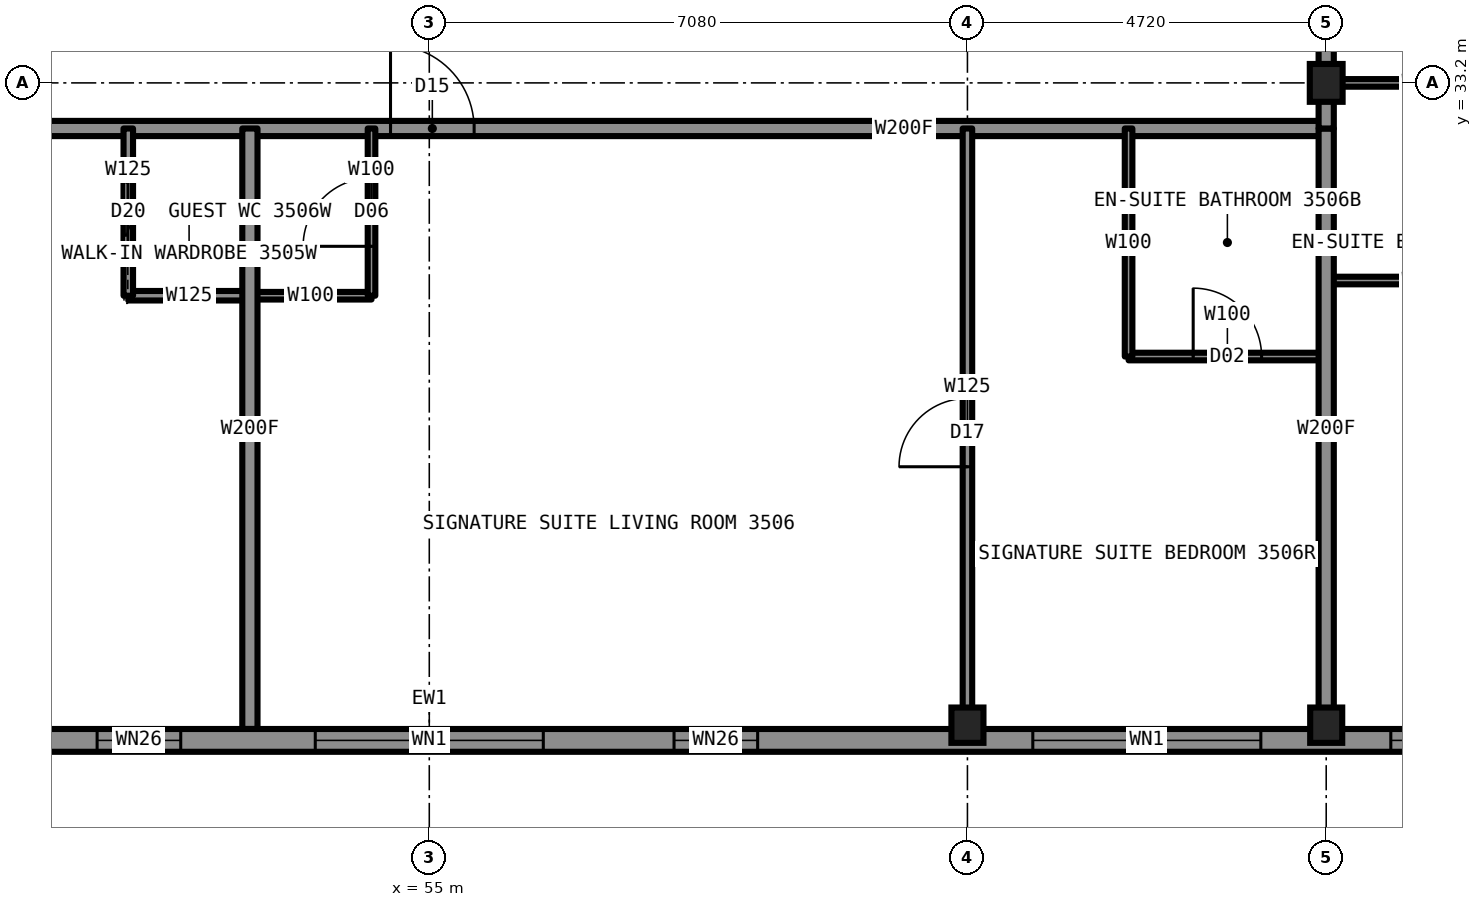
"""IFC4 building model, lengths in metres.
Left out: names, types, materials, properties, quantities, classifications, styles, units other than length and angle.
Written with IfcOpenShell. Run it as: python <this file> out.ifc"""

import sys

from ifc_helpers import new_model, si_unit, direction, frame, frame_2d, origin, origin_2d, place, context, subcontext, project, spatial, rectangle, i_section, extrude, element, fill, save


model = new_model("IFC4")
c1 = context("Model", 3, precision=1e-05, world=origin(), true_north=direction((0.0, 1.0)))
c2 = subcontext(c1, "Body", "Model", "MODEL_VIEW")
j1 = project(units=[si_unit("LENGTHUNIT", "METRE"), si_unit("PLANEANGLEUNIT", "RADIAN")], contexts=[c1])
p1 = place(None, origin())
s1 = spatial("IfcSite", under=j1, at=p1, CompositionType="ELEMENT")
p2 = place(p1, origin())
s2 = spatial("IfcBuilding", under=s1, at=p2, CompositionType="ELEMENT")
p3 = place(p2, frame((0.0, 0.0, 124.9)))
s3 = spatial("IfcBuildingStorey", under=s2, at=p3, CompositionType="ELEMENT", Elevation=124.9)
for number, where, z_axis, x_axis in (
    (1, (62.08, 24.75, 0.0), (0.0, 0.0, 1.0), (1.0, 0.0, 0.0)),
    (2, (66.8, 24.75, 0.0), (0.0, 0.0, 1.0), (1.0, 0.0, 0.0)),
):
    element("IfcColumn", number, at=place(p3, frame(where, z_axis=z_axis, x_axis=x_axis)), inside=s3, PredefinedType="COLUMN", context=c2, shape_type="SweptSolid", body=[
        extrude(i_section(OverallWidth=0.422, OverallDepth=0.465, WebThickness=0.045, FlangeThickness=0.073, at=origin_2d()), origin(), (0.0, 0.0, 1.0), 3.5),
    ])
p4 = place(p3, frame((66.8, 33.2, 0.0), z_axis=(0.0, 0.0, 1.0), x_axis=(1.0, 0.0, 0.0)))
e3 = element("IfcColumn", 3, at=p4, inside=s3, PredefinedType="COLUMN", context=c2, shape_type="SweptSolid", body=[
    extrude(i_section(OverallWidth=0.432, OverallDepth=0.498, WebThickness=0.056, FlangeThickness=0.089, at=origin_2d()), origin(), (0.0, 0.0, 1.0), 3.5),
])
p5 = place(p3, frame((66.8, 33.2, 0.0), z_axis=(0.0, 0.0, 1.0), x_axis=(1.0, 0.0, 0.0)))
e4 = element("IfcWall", 4, at=p5, inside=s3, PredefinedType="PARTITIONING", context=c2, shape_type="SweptSolid", body=[
    extrude(rectangle(XDim=2.6, YDim=0.1, at=frame_2d((1.3, 0.0))), origin(), (0.0, 0.0, 1.0), 2.573),
])
p6 = place(p3, frame((43.2, 32.6, 0.0), z_axis=(0.0, 0.0, 1.0), x_axis=(1.0, 0.0, 0.0)))
e5 = element("IfcWall", 5, at=p6, inside=s3, PredefinedType="PARTITIONING", context=c2, shape_type="SweptSolid", body=[
    extrude(rectangle(XDim=23.6, YDim=0.2, at=frame_2d((11.8, 0.0))), origin(), (0.0, 0.0, 1.0), 3.33),
])
p7 = place(p6, frame((3.0, 0.0, 0.0)))
e6 = element("IfcOpeningElement", 6, at=p7, cuts=e5, PredefinedType="OPENING", context=c2, shape_type="SweptSolid", body=[
    extrude(rectangle(XDim=1.0, YDim=2.2, at=frame_2d((0.5, 1.1))), frame((0.0, 0.11, 0.0), z_axis=(0.0, -1.0, 0.0), x_axis=(1.0, 0.0, 0.0)), (0.0, 0.0, 1.0), 0.22),
])
p8 = place(p6, frame((11.29, 0.0, 0.0)))
e7 = element("IfcOpeningElement", 7, at=p8, cuts=e5, PredefinedType="OPENING", context=c2, shape_type="SweptSolid", body=[
    extrude(rectangle(XDim=1.1, YDim=2.2, at=frame_2d((0.55, 1.1))), frame((0.0, 0.11, 0.0), z_axis=(0.0, -1.0, 0.0), x_axis=(1.0, 0.0, 0.0)), (0.0, 0.0, 1.0), 0.22),
])
p9 = place(p3, frame((66.8, 30.6, 0.0), z_axis=(0.0, 0.0, 1.0), x_axis=(1.0, 0.0, 0.0)))
e8 = element("IfcWall", 8, at=p9, inside=s3, PredefinedType="PARTITIONING", context=c2, shape_type="SweptSolid", body=[
    extrude(rectangle(XDim=2.6, YDim=0.1, at=frame_2d((1.3, 0.0))), origin(), (0.0, 0.0, 1.0), 3.33),
])
p10 = place(p3, frame((52.64, 30.4, 0.0), z_axis=(0.0, 0.0, 1.0), x_axis=(1.0, 0.0, 0.0)))
e9 = element("IfcWall", 9, at=p10, inside=s3, PredefinedType="PARTITIONING", context=c2, shape_type="SweptSolid", body=[
    extrude(rectangle(XDim=1.6, YDim=0.1, at=frame_2d((0.8, 0.0))), origin(), (0.0, 0.0, 1.0), 3.33),
])
p11 = place(p3, frame((51.04, 30.4, 0.0), z_axis=(0.0, 0.0, 1.0), x_axis=(1.0, 0.0, 0.0)))
e10 = element("IfcWall", 10, at=p11, inside=s3, PredefinedType="PARTITIONING", context=c2, shape_type="SweptSolid", body=[
    extrude(rectangle(XDim=1.6, YDim=0.125, at=frame_2d((0.8, 0.0))), origin(), (0.0, 0.0, 1.0), 3.33),
])
p12 = place(p3, frame((64.2, 29.6, 0.0), z_axis=(0.0, 0.0, 1.0), x_axis=(1.0, 0.0, 0.0)))
e11 = element("IfcWall", 11, at=p12, inside=s3, PredefinedType="PARTITIONING", context=c2, shape_type="SweptSolid", body=[
    extrude(rectangle(XDim=2.6, YDim=0.1, at=frame_2d((1.3, 0.0))), origin(), (0.0, 0.0, 1.0), 3.33),
])
p13 = place(p12, frame((0.85, 0.0, 0.0)))
e12 = element("IfcOpeningElement", 12, at=p13, cuts=e11, PredefinedType="OPENING", context=c2, shape_type="SweptSolid", body=[
    extrude(rectangle(XDim=0.9, YDim=2.1, at=frame_2d((0.45, 1.05))), frame((0.0, 0.06, 0.0), z_axis=(0.0, -1.0, 0.0), x_axis=(1.0, 0.0, 0.0)), (0.0, 0.0, 1.0), 0.12),
])
p14 = place(p3, frame((54.24, 30.4, 0.0), z_axis=(0.0, 0.0, 1.0), x_axis=(0.0, 1.0, 0.0)))
e13 = element("IfcWall", 13, at=p14, inside=s3, PredefinedType="PARTITIONING", context=c2, shape_type="SweptSolid", body=[
    extrude(rectangle(XDim=2.2, YDim=0.1, at=frame_2d((1.1, 0.0))), origin(), (0.0, 0.0, 1.0), 3.33),
])
p15 = place(p14, frame((0.65, 0.0, 0.0)))
e14 = element("IfcOpeningElement", 14, at=p15, cuts=e13, PredefinedType="OPENING", context=c2, shape_type="SweptSolid", body=[
    extrude(rectangle(XDim=0.9, YDim=2.1, at=frame_2d((0.45, 1.05))), frame((0.0, 0.06, 0.0), z_axis=(0.0, -1.0, 0.0), x_axis=(1.0, 0.0, 0.0)), (0.0, 0.0, 1.0), 0.12),
])
p16 = place(p3, frame((52.64, 24.7, 0.0), z_axis=(0.0, 0.0, 1.0), x_axis=(0.0, 1.0, 0.0)))
e15 = element("IfcWall", 15, at=p16, inside=s3, PredefinedType="PARTITIONING", context=c2, shape_type="SweptSolid", body=[
    extrude(rectangle(XDim=7.9, YDim=0.2, at=frame_2d((3.95, 0.0))), origin(), (0.0, 0.0, 1.0), 3.33),
])
p17 = place(p3, frame((51.04, 30.4, 0.0), z_axis=(0.0, 0.0, 1.0), x_axis=(0.0, 1.0, 0.0)))
e16 = element("IfcWall", 16, at=p17, inside=s3, PredefinedType="PARTITIONING", context=c2, shape_type="SweptSolid", body=[
    extrude(rectangle(XDim=2.2, YDim=0.125, at=frame_2d((1.1, 0.0))), origin(), (0.0, 0.0, 1.0), 3.33),
])
p18 = place(p17, frame((0.7, 0.0, 0.0)))
e17 = element("IfcOpeningElement", 17, at=p18, cuts=e16, PredefinedType="OPENING", context=c2, shape_type="SweptSolid", body=[
    extrude(rectangle(XDim=0.8, YDim=2.1, at=frame_2d((0.4, 1.05))), frame((0.0, 0.073, 0.0), z_axis=(0.0, -1.0, 0.0), x_axis=(1.0, 0.0, 0.0)), (0.0, 0.0, 1.0), 0.145),
])
p19 = place(p3, frame((66.8, 33.22, 0.0), z_axis=(0.0, 0.0, 1.0), x_axis=(0.0, 1.0, 0.0)))
e18 = element("IfcWall", 18, at=p19, inside=s3, PredefinedType="PARTITIONING", context=c2, shape_type="SweptSolid", body=[
    extrude(rectangle(XDim=23.58, YDim=0.2, at=frame_2d((11.79, 0.0))), origin(), (0.0, 0.0, 1.0), 3.33),
])
p20 = place(p19, frame((7.85, 0.0, 0.0)))
e19 = element("IfcOpeningElement", 19, at=p20, cuts=e18, PredefinedType="OPENING", context=c2, shape_type="SweptSolid", body=[
    extrude(rectangle(XDim=1.0, YDim=2.2, at=frame_2d((0.5, 1.1))), frame((0.0, 0.11, 0.0), z_axis=(0.0, -1.0, 0.0), x_axis=(1.0, 0.0, 0.0)), (0.0, 0.0, 1.0), 0.22),
])
p21 = place(p19, frame((12.42, 0.0, 0.0)))
e20 = element("IfcOpeningElement", 20, at=p21, cuts=e18, PredefinedType="OPENING", context=c2, shape_type="SweptSolid", body=[
    extrude(rectangle(XDim=1.0, YDim=2.2, at=frame_2d((0.5, 1.1))), frame((0.0, 0.11, 0.0), z_axis=(0.0, -1.0, 0.0), x_axis=(1.0, 0.0, 0.0)), (0.0, 0.0, 1.0), 0.22),
])
p22 = place(p19, frame((21.83, 0.0, 0.0)))
e21 = element("IfcOpeningElement", 21, at=p22, cuts=e18, PredefinedType="OPENING", context=c2, shape_type="SweptSolid", body=[
    extrude(rectangle(XDim=1.1, YDim=2.2, at=frame_2d((0.55, 1.1))), frame((0.0, 0.11, 0.0), z_axis=(0.0, -1.0, 0.0), x_axis=(1.0, 0.0, 0.0)), (0.0, 0.0, 1.0), 0.22),
])
p23 = place(p19, frame((0.63, 0.0, 0.0)))
e22 = element("IfcOpeningElement", 22, at=p23, cuts=e18, PredefinedType="OPENING", context=c2, shape_type="SweptSolid", body=[
    extrude(rectangle(XDim=1.1, YDim=2.2, at=frame_2d((0.55, 1.1))), frame((0.0, 0.11, 0.0), z_axis=(0.0, -1.0, 0.0), x_axis=(1.0, 0.0, 0.0)), (0.0, 0.0, 1.0), 0.22),
])
p24 = place(p3, frame((66.8, 24.7, 0.0), z_axis=(0.0, 0.0, 1.0), x_axis=(0.0, 1.0, 0.0)))
e23 = element("IfcWall", 23, at=p24, inside=s3, PredefinedType="PARTITIONING", context=c2, shape_type="SweptSolid", body=[
    extrude(rectangle(XDim=7.9, YDim=0.2, at=frame_2d((3.95, 0.0))), origin(), (0.0, 0.0, 1.0), 2.573),
])
p25 = place(p3, frame((62.08, 24.7, 0.0), z_axis=(0.0, 0.0, 1.0), x_axis=(0.0, 1.0, 0.0)))
e24 = element("IfcWall", 24, at=p25, inside=s3, PredefinedType="PARTITIONING", context=c2, shape_type="SweptSolid", body=[
    extrude(rectangle(XDim=7.9, YDim=0.125, at=frame_2d((3.95, 0.0))), origin(), (0.0, 0.0, 1.0), 2.573),
])
p26 = place(p25, frame((3.45, 0.0, 0.0)))
e25 = element("IfcOpeningElement", 25, at=p26, cuts=e24, PredefinedType="OPENING", context=c2, shape_type="SweptSolid", body=[
    extrude(rectangle(XDim=0.9, YDim=2.2, at=frame_2d((0.45, 1.1))), frame((0.0, 0.073, 0.0), z_axis=(0.0, -1.0, 0.0), x_axis=(1.0, 0.0, 0.0)), (0.0, 0.0, 1.0), 0.145),
])
p27 = place(p3, frame((64.2, 29.6, 0.0), z_axis=(0.0, 0.0, 1.0), x_axis=(0.0, 1.0, 0.0)))
e26 = element("IfcWall", 26, at=p27, inside=s3, PredefinedType="PARTITIONING", context=c2, shape_type="SweptSolid", body=[
    extrude(rectangle(XDim=3.0, YDim=0.1, at=frame_2d((1.5, 0.0))), origin(), (0.0, 0.0, 1.0), 3.33),
])
p28 = place(p3, frame((39.9, 24.55, 0.0), z_axis=(0.0, 0.0, 1.0), x_axis=(1.0, 0.0, 0.0)))
e27 = element("IfcWall", 27, at=p28, inside=s3, PredefinedType="SOLIDWALL", context=c2, shape_type="SweptSolid", body=[
    extrude(rectangle(XDim=30.2, YDim=0.3, at=frame_2d((15.1, 0.0))), origin(), (0.0, 0.0, 1.0), 2.83),
])
p29 = place(p28, frame((0.85, 0.0, 0.5)))
e28 = element("IfcOpeningElement", 28, at=p29, cuts=e27, PredefinedType="OPENING", context=c2, shape_type="SweptSolid", body=[
    extrude(rectangle(XDim=1.6, YDim=2.0, at=frame_2d((0.8, 1.0))), frame((0.0, 0.16, 0.0), z_axis=(0.0, -1.0, 0.0), x_axis=(1.0, 0.0, 0.0)), (0.0, 0.0, 1.0), 0.32),
])
p30 = place(p28, frame((4.16, 0.0, 0.5)))
e29 = element("IfcOpeningElement", 29, at=p30, cuts=e27, PredefinedType="OPENING", context=c2, shape_type="SweptSolid", body=[
    extrude(rectangle(XDim=3.0, YDim=2.0, at=frame_2d((1.5, 1.0))), frame((0.0, 0.16, 0.0), z_axis=(0.0, -1.0, 0.0), x_axis=(1.0, 0.0, 0.0)), (0.0, 0.0, 1.0), 0.32),
])
p31 = place(p28, frame((8.88, 0.0, 0.5)))
e30 = element("IfcOpeningElement", 30, at=p31, cuts=e27, PredefinedType="OPENING", context=c2, shape_type="SweptSolid", body=[
    extrude(rectangle(XDim=3.0, YDim=2.0, at=frame_2d((1.5, 1.0))), frame((0.0, 0.16, 0.0), z_axis=(0.0, -1.0, 0.0), x_axis=(1.0, 0.0, 0.0)), (0.0, 0.0, 1.0), 0.32),
])
p32 = place(p28, frame((18.32, 0.0, 0.5)))
e31 = element("IfcOpeningElement", 31, at=p32, cuts=e27, PredefinedType="OPENING", context=c2, shape_type="SweptSolid", body=[
    extrude(rectangle(XDim=3.0, YDim=2.0, at=frame_2d((1.5, 1.0))), frame((0.0, 0.16, 0.0), z_axis=(0.0, -1.0, 0.0), x_axis=(1.0, 0.0, 0.0)), (0.0, 0.0, 1.0), 0.32),
])
p33 = place(p28, frame((23.04, 0.0, 0.5)))
e32 = element("IfcOpeningElement", 32, at=p33, cuts=e27, PredefinedType="OPENING", context=c2, shape_type="SweptSolid", body=[
    extrude(rectangle(XDim=3.0, YDim=2.0, at=frame_2d((1.5, 1.0))), frame((0.0, 0.16, 0.0), z_axis=(0.0, -1.0, 0.0), x_axis=(1.0, 0.0, 0.0)), (0.0, 0.0, 1.0), 0.32),
])
p34 = place(p28, frame((27.75, 0.0, 0.5)))
e33 = element("IfcOpeningElement", 33, at=p34, cuts=e27, PredefinedType="OPENING", context=c2, shape_type="SweptSolid", body=[
    extrude(rectangle(XDim=1.6, YDim=2.0, at=frame_2d((0.8, 1.0))), frame((0.0, 0.16, 0.0), z_axis=(0.0, -1.0, 0.0), x_axis=(1.0, 0.0, 0.0)), (0.0, 0.0, 1.0), 0.32),
])
p35 = place(p3, frame((66.8, 32.6, 0.0), z_axis=(0.0, 0.0, 1.0), x_axis=(0.0, 1.0, 0.0)))
e34 = element("IfcWall", 34, at=p35, inside=s3, PredefinedType="PARTITIONING", context=c2, shape_type="SweptSolid", body=[
    extrude(rectangle(XDim=0.62, YDim=0.2, at=frame_2d((0.31, 0.0))), origin(), (0.0, 0.0, 1.0), 2.573),
])
p36 = place(p18, origin())
e35 = element("IfcDoor", 35, at=p36, inside=s3, OperationType="SLIDING_TO_LEFT", PredefinedType="DOOR", context=c2, shape_type="SweptSolid", body=[
    extrude(rectangle(XDim=0.8, YDim=2.1, at=frame_2d((0.4, 1.05))), frame((0.0, 0.025, 0.0), z_axis=(0.0, -1.0, 0.0), x_axis=(1.0, 0.0, 0.0)), (0.0, 0.0, 1.0), 0.05),
])
fill(e17, e35)
p37 = place(p8, origin())
e36 = element("IfcDoor", 36, at=p37, inside=s3, OperationType="SINGLE_SWING_LEFT", PredefinedType="DOOR", context=c2, shape_type="SweptSolid", body=[
    extrude(rectangle(XDim=1.1, YDim=2.2, at=frame_2d((0.55, 1.1))), frame((0.0, 0.025, 0.0), z_axis=(0.0, -1.0, 0.0), x_axis=(1.0, 0.0, 0.0)), (0.0, 0.0, 1.0), 0.05),
])
fill(e7, e36)
p38 = place(p13, origin())
e37 = element("IfcDoor", 37, at=p38, inside=s3, OperationType="SINGLE_SWING_RIGHT", PredefinedType="DOOR", context=c2, shape_type="SweptSolid", body=[
    extrude(rectangle(XDim=0.9, YDim=2.1, at=frame_2d((0.45, 1.05))), frame((0.0, 0.025, 0.0), z_axis=(0.0, -1.0, 0.0), x_axis=(1.0, 0.0, 0.0)), (0.0, 0.0, 1.0), 0.05),
])
fill(e12, e37)
p39 = place(p26, origin())
e38 = element("IfcDoor", 38, at=p39, inside=s3, OperationType="SINGLE_SWING_LEFT", PredefinedType="DOOR", context=c2, shape_type="SweptSolid", body=[
    extrude(rectangle(XDim=0.9, YDim=2.2, at=frame_2d((0.45, 1.1))), frame((0.0, 0.025, 0.0), z_axis=(0.0, -1.0, 0.0), x_axis=(1.0, 0.0, 0.0)), (0.0, 0.0, 1.0), 0.05),
])
fill(e25, e38)
p40 = place(p15, origin())
e39 = element("IfcDoor", 39, at=p40, inside=s3, OperationType="SINGLE_SWING_LEFT", PredefinedType="DOOR", context=c2, shape_type="SweptSolid", body=[
    extrude(rectangle(XDim=0.9, YDim=2.1, at=frame_2d((0.45, 1.05))), frame((0.0, 0.025, 0.0), z_axis=(0.0, -1.0, 0.0), x_axis=(1.0, 0.0, 0.0)), (0.0, 0.0, 1.0), 0.05),
])
fill(e14, e39)
p41 = place(p31, origin())
e40 = element("IfcWindow", 40, at=p41, inside=s3, PartitioningType="SINGLE_PANEL", PredefinedType="WINDOW", context=c2, shape_type="SweptSolid", body=[
    extrude(rectangle(XDim=3.0, YDim=2.0, at=frame_2d((1.5, 1.0))), frame((0.0, 0.03, 0.0), z_axis=(0.0, -1.0, 0.0), x_axis=(1.0, 0.0, 0.0)), (0.0, 0.0, 1.0), 0.06),
])
fill(e30, e40)
p42 = place(p32, origin())
e41 = element("IfcWindow", 41, at=p42, inside=s3, PartitioningType="SINGLE_PANEL", PredefinedType="WINDOW", context=c2, shape_type="SweptSolid", body=[
    extrude(rectangle(XDim=3.0, YDim=2.0, at=frame_2d((1.5, 1.0))), frame((0.0, 0.03, 0.0), z_axis=(0.0, -1.0, 0.0), x_axis=(1.0, 0.0, 0.0)), (0.0, 0.0, 1.0), 0.06),
])
fill(e31, e41)
p43 = place(p33, origin())
e42 = element("IfcWindow", 42, at=p43, inside=s3, PartitioningType="SINGLE_PANEL", PredefinedType="WINDOW", context=c2, shape_type="SweptSolid", body=[
    extrude(rectangle(XDim=3.0, YDim=2.0, at=frame_2d((1.5, 1.0))), frame((0.0, 0.03, 0.0), z_axis=(0.0, -1.0, 0.0), x_axis=(1.0, 0.0, 0.0)), (0.0, 0.0, 1.0), 0.06),
])
fill(e32, e42)
p44 = place(p34, origin())
e43 = element("IfcWindow", 43, at=p44, inside=s3, PartitioningType="SINGLE_PANEL", PredefinedType="WINDOW", context=c2, shape_type="SweptSolid", body=[
    extrude(rectangle(XDim=1.6, YDim=2.0, at=frame_2d((0.8, 1.0))), frame((0.0, 0.03, 0.0), z_axis=(0.0, -1.0, 0.0), x_axis=(1.0, 0.0, 0.0)), (0.0, 0.0, 1.0), 0.06),
])
fill(e33, e43)
save(model, sys.argv[1])
